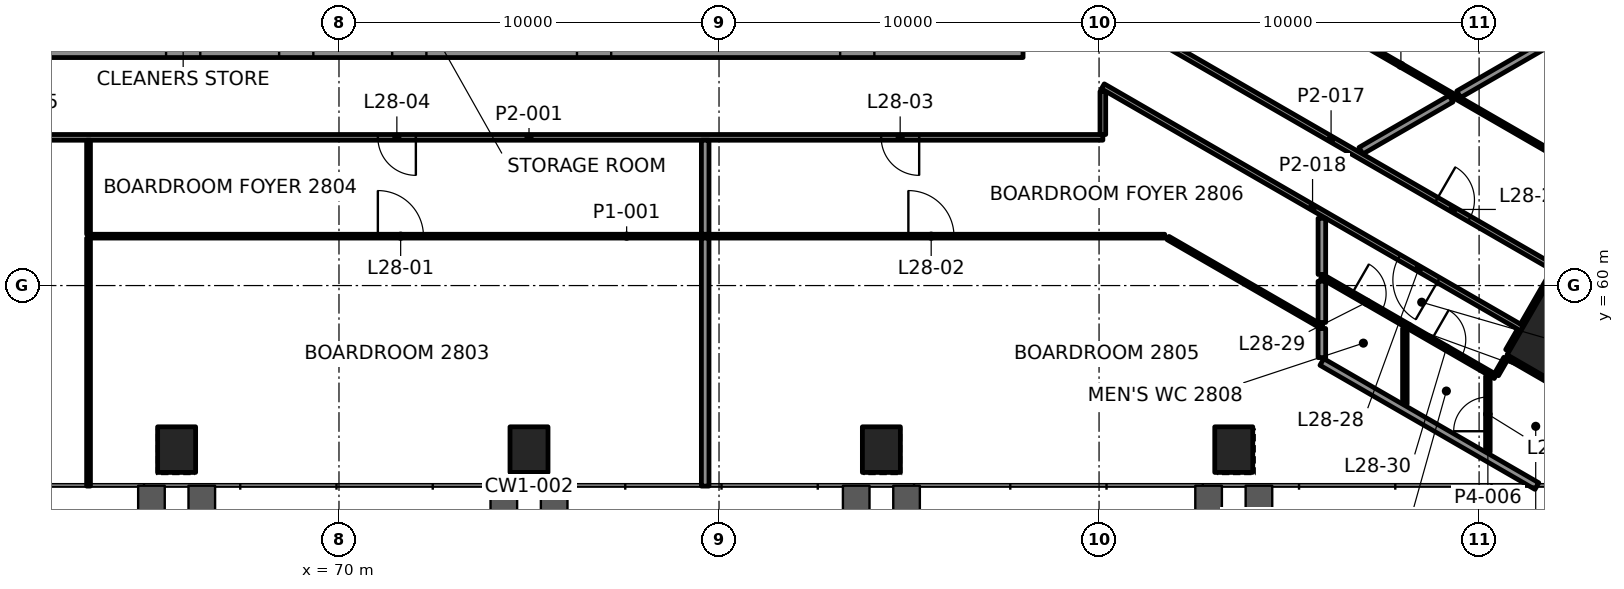
"""IFC4 building model, lengths in metres.
Left out: names, types, materials, properties, quantities, classifications, styles, units other than length and angle.
Written with IfcOpenShell. Run it as: python <this file> out.ifc"""

import sys

from ifc_helpers import new_model, si_unit, direction, frame, frame_2d, origin, origin_2d, place, context, subcontext, project, spatial, rectangle, extrude, element, fill, save


model = new_model("IFC4")
c1 = context("Model", 3, precision=1e-05, world=origin(), true_north=direction((0.0, 1.0)))
c2 = subcontext(c1, "Body", "Model", "MODEL_VIEW")
j1 = project(units=[si_unit("LENGTHUNIT", "METRE"), si_unit("PLANEANGLEUNIT", "RADIAN")], contexts=[c1])
p1 = place(None, origin())
s1 = spatial("IfcSite", under=j1, at=p1, CompositionType="ELEMENT")
p2 = place(p1, origin())
s2 = spatial("IfcBuilding", under=s1, at=p2, CompositionType="ELEMENT")
p3 = place(p2, frame((0.0, 0.0, 124.0)))
s3 = spatial("IfcBuildingStorey", under=s2, at=p3, CompositionType="ELEMENT", Elevation=124.0)
p4 = place(p3, frame((103.058, 58.801, 0.0), z_axis=(0.0, 0.0, 1.0), x_axis=(0.5, 0.866025403784, 0.0)))
e1 = element("IfcColumn", 1, at=p4, inside=s3, PredefinedType="COLUMN", context=c2, shape_type="SweptSolid", body=[
    extrude(rectangle(XDim=3.4, YDim=3.4, at=origin_2d()), origin(), (0.0, 0.0, 1.0), 4.2),
])
for number, where, z_axis, x_axis in (
    (2, (65.728, 55.683, -0.0), (0.0, 0.0, 1.0), (1.0, 0.0, 0.0)),
    (3, (75.0, 55.683, -0.0), (0.0, 0.0, 1.0), (1.0, 0.0, 0.0)),
    (4, (84.272, 55.683, -0.0), (0.0, 0.0, 1.0), (1.0, 0.0, 0.0)),
    (5, (93.545, 55.683, -0.0), (0.0, 0.0, 1.0), (1.0, 0.0, 0.0)),
):
    element("IfcColumn", number, at=place(p3, frame(where, z_axis=z_axis, x_axis=x_axis)), inside=s3, PredefinedType="COLUMN", context=c2, shape_type="SweptSolid", body=[
        extrude(rectangle(XDim=1.0, YDim=1.2, at=origin_2d()), origin(), (0.0, 0.0, 1.0), 4.2),
    ])
p5 = place(p3, frame((62.0, 66.45, 0.0), z_axis=(0.0, 0.0, 1.0), x_axis=(1.0, 0.0, 0.0)))
e6 = element("IfcWall", 6, at=p5, inside=s3, PredefinedType="SHEAR", context=c2, shape_type="SweptSolid", body=[
    extrude(rectangle(XDim=26.0, YDim=0.9, at=frame_2d((13.0, 0.0))), origin(), (0.0, 0.0, 1.0), 4.0),
])
p6 = place(p5, frame((3.45, 0.0, 0.0)))
e7 = element("IfcOpeningElement", 7, at=p6, cuts=e6, PredefinedType="OPENING", context=c2, shape_type="SweptSolid", body=[
    extrude(rectangle(XDim=0.9, YDim=2.1, at=frame_2d((0.45, 1.05))), frame((0.0, 0.46, 0.0), z_axis=(0.0, -1.0, 0.0), x_axis=(1.0, 0.0, 0.0)), (0.0, 0.0, 1.0), 0.92),
])
p7 = place(p5, frame((6.425, 0.0, 0.0)))
e8 = element("IfcOpeningElement", 8, at=p7, cuts=e6, PredefinedType="OPENING", context=c2, shape_type="SweptSolid", body=[
    extrude(rectangle(XDim=0.9, YDim=2.1, at=frame_2d((0.45, 1.05))), frame((0.0, 0.46, 0.0), z_axis=(0.0, -1.0, 0.0), x_axis=(1.0, 0.0, 0.0)), (0.0, 0.0, 1.0), 0.92),
])
p8 = place(p5, frame((9.4, 0.0, 0.0)))
e9 = element("IfcOpeningElement", 9, at=p8, cuts=e6, PredefinedType="OPENING", context=c2, shape_type="SweptSolid", body=[
    extrude(rectangle(XDim=0.9, YDim=2.1, at=frame_2d((0.45, 1.05))), frame((0.0, 0.46, 0.0), z_axis=(0.0, -1.0, 0.0), x_axis=(1.0, 0.0, 0.0)), (0.0, 0.0, 1.0), 0.92),
])
p9 = place(p5, frame((14.262, 0.0, 0.0)))
e10 = element("IfcOpeningElement", 10, at=p9, cuts=e6, PredefinedType="OPENING", context=c2, shape_type="SweptSolid", body=[
    extrude(rectangle(XDim=0.9, YDim=2.1, at=frame_2d((0.45, 1.05))), frame((0.0, 0.46, 0.0), z_axis=(0.0, -1.0, 0.0), x_axis=(1.0, 0.0, 0.0)), (0.0, 0.0, 1.0), 0.92),
])
p10 = place(p5, frame((21.188, 0.0, 0.0)))
e11 = element("IfcOpeningElement", 11, at=p10, cuts=e6, PredefinedType="OPENING", context=c2, shape_type="SweptSolid", body=[
    extrude(rectangle(XDim=0.9, YDim=2.1, at=frame_2d((0.45, 1.05))), frame((0.0, 0.46, 0.0), z_axis=(0.0, -1.0, 0.0), x_axis=(1.0, 0.0, 0.0)), (0.0, 0.0, 1.0), 0.92),
])
p11 = place(p3, frame((63.41, 61.3, 0.0), z_axis=(0.0, 0.0, 1.0), x_axis=(1.0, 0.0, 0.0)))
e12 = element("IfcWall", 12, at=p11, inside=s3, PredefinedType="PARTITIONING", context=c2, shape_type="SweptSolid", body=[
    extrude(rectangle(XDim=28.319, YDim=0.1, at=frame_2d((14.16, 0.0))), origin(), (0.0, 0.0, 1.0), 3.4),
])
p12 = place(p11, frame((7.613, 0.0, 0.0)))
e13 = element("IfcOpeningElement", 13, at=p12, cuts=e12, PredefinedType="OPENING", context=c2, shape_type="SweptSolid", body=[
    extrude(rectangle(XDim=1.2, YDim=2.1, at=frame_2d((0.6, 1.05))), frame((0.0, 0.06, 0.0), z_axis=(0.0, -1.0, 0.0), x_axis=(1.0, 0.0, 0.0)), (0.0, 0.0, 1.0), 0.12),
])
p13 = place(p11, frame((21.573, 0.0, 0.0)))
e14 = element("IfcOpeningElement", 14, at=p13, cuts=e12, PredefinedType="OPENING", context=c2, shape_type="SweptSolid", body=[
    extrude(rectangle(XDim=1.2, YDim=2.1, at=frame_2d((0.6, 1.05))), frame((0.0, 0.06, 0.0), z_axis=(0.0, -1.0, 0.0), x_axis=(1.0, 0.0, 0.0)), (0.0, 0.0, 1.0), 0.12),
])
p14 = place(p3, frame((90.1, 63.9, 0.0), z_axis=(0.0, 0.0, 1.0), x_axis=(-1.0, 0.0, 0.0)))
e15 = element("IfcWall", 15, at=p14, inside=s3, PredefinedType="PARTITIONING", context=c2, shape_type="SweptSolid", body=[
    extrude(rectangle(XDim=30.2, YDim=0.15, at=frame_2d((15.1, 0.0))), origin(), (0.0, 0.0, 1.0), 3.4),
])
p15 = place(p14, frame((4.833, 0.0, 0.0)))
e16 = element("IfcOpeningElement", 16, at=p15, cuts=e15, PredefinedType="OPENING", context=c2, shape_type="SweptSolid", body=[
    extrude(rectangle(XDim=1.0, YDim=2.1, at=frame_2d((0.5, 1.05))), frame((0.0, 0.085, 0.0), z_axis=(0.0, -1.0, 0.0), x_axis=(1.0, 0.0, 0.0)), (0.0, 0.0, 1.0), 0.17),
])
p16 = place(p14, frame((18.077, 0.0, 0.0)))
e17 = element("IfcOpeningElement", 17, at=p16, cuts=e15, PredefinedType="OPENING", context=c2, shape_type="SweptSolid", body=[
    extrude(rectangle(XDim=1.0, YDim=2.1, at=frame_2d((0.5, 1.05))), frame((0.0, 0.085, 0.0), z_axis=(0.0, -1.0, 0.0), x_axis=(1.0, 0.0, 0.0)), (0.0, 0.0, 1.0), 0.17),
])
p17 = place(p14, frame((27.893, 0.0, 0.0)))
e18 = element("IfcOpeningElement", 18, at=p17, cuts=e15, PredefinedType="OPENING", context=c2, shape_type="SweptSolid", body=[
    extrude(rectangle(XDim=0.9, YDim=2.1, at=frame_2d((0.45, 1.05))), frame((0.0, 0.085, 0.0), z_axis=(0.0, -1.0, 0.0), x_axis=(1.0, 0.0, 0.0)), (0.0, 0.0, 1.0), 0.17),
])
p18 = place(p3, frame((96.89, 63.548, 0.0), z_axis=(0.0, 0.0, 1.0), x_axis=(0.86604168154, 0.499971805041, 0.0)))
e19 = element("IfcWall", 19, at=p18, inside=s3, PredefinedType="PARTITIONING", context=c2, shape_type="SweptSolid", body=[
    extrude(rectangle(XDim=2.74, YDim=0.2, at=frame_2d((1.37, 0.0))), origin(), (0.0, 0.0, 1.0), 3.4),
])
p19 = place(p3, frame((100.458, 57.658, 0.0), z_axis=(0.0, 0.0, 1.0), x_axis=(0.499895202697, 0.866085900082, 0.0)))
e20 = element("IfcWall", 20, at=p19, inside=s3, PredefinedType="PARTITIONING", context=c2, shape_type="SweptSolid", body=[
    extrude(rectangle(XDim=0.489, YDim=0.12, at=frame_2d((0.245, 0.0))), origin(), (0.0, 0.0, 1.0), 3.4),
])
p20 = place(p3, frame((100.786, 58.265, 0.0), z_axis=(0.0, 0.0, 1.0), x_axis=(0.499880341542, 0.866094477606, 0.0)))
e21 = element("IfcWall", 21, at=p20, inside=s3, PredefinedType="PARTITIONING", context=c2, shape_type="SweptSolid", body=[
    extrude(rectangle(XDim=0.625, YDim=0.2, at=frame_2d((0.312, 0.0))), origin(), (0.0, 0.0, 1.0), 3.4),
])
p21 = place(p3, frame((100.231, 55.623, 0.0), z_axis=(0.0, 0.0, 1.0), x_axis=(0.0, 1.0, 0.0)))
e22 = element("IfcWall", 22, at=p21, inside=s3, PredefinedType="PARTITIONING", context=c2, shape_type="SweptSolid", body=[
    extrude(rectangle(XDim=1.987, YDim=0.12, at=frame_2d((0.993, 0.0))), origin(), (0.0, 0.0, 1.0), 3.4),
])
p22 = place(p21, frame((0.543, 0.0, 0.0)))
e23 = element("IfcOpeningElement", 23, at=p22, cuts=e22, PredefinedType="OPENING", context=c2, shape_type="SweptSolid", body=[
    extrude(rectangle(XDim=0.9, YDim=2.1, at=frame_2d((0.45, 1.05))), frame((0.0, 0.07, 0.0), z_axis=(0.0, -1.0, 0.0), x_axis=(1.0, 0.0, 0.0)), (0.0, 0.0, 1.0), 0.14),
])
p23 = place(p3, frame((98.047, 56.884, 0.0), z_axis=(0.0, 0.0, 1.0), x_axis=(0.0, 1.0, 0.0)))
e24 = element("IfcWall", 24, at=p23, inside=s3, PredefinedType="PARTITIONING", context=c2, shape_type="SweptSolid", body=[
    extrude(rectangle(XDim=1.987, YDim=0.12, at=frame_2d((0.993, 0.0))), origin(), (0.0, 0.0, 1.0), 3.4),
])
p24 = place(p3, frame((95.863, 58.105, 0.0), z_axis=(0.0, 0.0, 1.0), x_axis=(0.0, 1.0, 0.0)))
e25 = element("IfcWall", 25, at=p24, inside=s3, PredefinedType="PARTITIONING", context=c2, shape_type="SweptSolid", body=[
    extrude(rectangle(XDim=0.765, YDim=0.2, at=frame_2d((0.383, 0.0))), origin(), (0.0, 0.0, 1.0), 3.4),
])
p25 = place(p3, frame((90.1, 63.975, 0.0), z_axis=(0.0, 0.0, 1.0), x_axis=(0.0, 1.0, 0.0)))
e26 = element("IfcWall", 26, at=p25, inside=s3, PredefinedType="PARTITIONING", context=c2, shape_type="SweptSolid", body=[
    extrude(rectangle(XDim=1.131, YDim=0.15, at=frame_2d((0.565, 0.0))), origin(), (0.0, 0.0, 1.0), 3.247),
])
p26 = place(p3, frame((79.636, 54.723, 0.0), z_axis=(0.0, 0.0, 1.0), x_axis=(0.0, 1.0, 0.0)))
e27 = element("IfcWall", 27, at=p26, inside=s3, PredefinedType="PARTITIONING", context=c2, shape_type="SweptSolid", body=[
    extrude(rectangle(XDim=6.527, YDim=0.2, at=frame_2d((3.264, 0.0))), origin(), (0.0, 0.0, 1.0), 3.165),
])
p27 = place(p3, frame((63.41, 54.723, 0.0), z_axis=(0.0, 0.0, 1.0), x_axis=(0.0, 1.0, 0.0)))
e28 = element("IfcWall", 28, at=p27, inside=s3, PredefinedType="PARTITIONING", context=c2, shape_type="SweptSolid", body=[
    extrude(rectangle(XDim=6.527, YDim=0.1, at=frame_2d((3.264, 0.0))), origin(), (0.0, 0.0, 1.0), 3.165),
])
p28 = place(p3, frame((103.185, 62.769, 0.0), z_axis=(0.0, 0.0, 1.0), x_axis=(-0.866024396652, 0.5000017444, 0.0)))
e29 = element("IfcWall", 29, at=p28, inside=s3, PredefinedType="PARTITIONING", context=c2, shape_type="SweptSolid", body=[
    extrude(rectangle(XDim=12.107, YDim=0.1, at=frame_2d((6.053, 0.0))), origin(), (0.0, 0.0, 1.0), 3.4),
])
p29 = place(p3, frame((90.175, 67.278, 0.0), z_axis=(0.0, 0.0, 1.0), x_axis=(0.866022903348, -0.500004330858, 0.0)))
e30 = element("IfcWall", 30, at=p29, inside=s3, PredefinedType="PARTITIONING", context=c2, shape_type="SweptSolid", body=[
    extrude(rectangle(XDim=13.695, YDim=0.15, at=frame_2d((6.848, 0.0))), origin(), (0.0, 0.0, 1.0), 3.4),
])
p30 = place(p29, frame((10.05, 0.0, 0.0)))
e31 = element("IfcOpeningElement", 31, at=p30, cuts=e30, PredefinedType="OPENING", context=c2, shape_type="SweptSolid", body=[
    extrude(rectangle(XDim=1.0, YDim=2.1, at=frame_2d((0.5, 1.05))), frame((0.0, 0.085, 0.0), z_axis=(0.0, -1.0, 0.0), x_axis=(1.0, 0.0, 0.0)), (0.0, 0.0, 1.0), 0.17),
])
p31 = place(p3, frame((101.136, 58.871, 0.0), z_axis=(0.0, 0.0, 1.0), x_axis=(-0.866020317169, 0.500008810174, 0.0)))
e32 = element("IfcWall", 32, at=p31, inside=s3, PredefinedType="PARTITIONING", context=c2, shape_type="SweptSolid", body=[
    extrude(rectangle(XDim=12.743, YDim=0.15, at=frame_2d((6.372, 0.0))), origin(), (0.0, 0.0, 1.0), 3.247),
])
p32 = place(p31, frame((2.546, 0.0, 0.0)))
e33 = element("IfcOpeningElement", 33, at=p32, cuts=e32, PredefinedType="OPENING", context=c2, shape_type="SweptSolid", body=[
    extrude(rectangle(XDim=1.2, YDim=2.1, at=frame_2d((0.6, 1.05))), frame((0.0, 0.085, 0.0), z_axis=(0.0, -1.0, 0.0), x_axis=(1.0, 0.0, 0.0)), (0.0, 0.0, 1.0), 0.17),
])
p33 = place(p3, frame((103.819, 56.398, 0.0), z_axis=(0.0, 0.0, 1.0), x_axis=(-0.866004308173, 0.500036536891, 0.0)))
e34 = element("IfcWall", 34, at=p33, inside=s3, PredefinedType="PARTITIONING", context=c2, shape_type="SweptSolid", body=[
    extrude(rectangle(XDim=3.544, YDim=0.2, at=frame_2d((1.772, 0.0))), origin(), (0.0, 0.0, 1.0), 3.4),
])
p34 = place(p3, frame((95.863, 60.241, 0.0), z_axis=(0.0, 0.0, 1.0), x_axis=(0.866028224559, -0.499995114243, 0.0)))
e35 = element("IfcWall", 35, at=p34, inside=s3, PredefinedType="PARTITIONING", context=c2, shape_type="SweptSolid", body=[
    extrude(rectangle(XDim=5.271, YDim=0.12, at=frame_2d((2.635, 0.0))), origin(), (0.0, 0.0, 1.0), 3.4),
])
p35 = place(p34, frame((0.913, 0.0, 0.0)))
e36 = element("IfcOpeningElement", 36, at=p35, cuts=e35, PredefinedType="OPENING", context=c2, shape_type="SweptSolid", body=[
    extrude(rectangle(XDim=0.9, YDim=2.1, at=frame_2d((0.45, 1.05))), frame((0.0, 0.07, 0.0), z_axis=(0.0, -1.0, 0.0), x_axis=(1.0, 0.0, 0.0)), (0.0, 0.0, 1.0), 0.14),
])
p36 = place(p34, frame((3.333, 0.0, 0.0)))
e37 = element("IfcOpeningElement", 37, at=p36, cuts=e35, PredefinedType="OPENING", context=c2, shape_type="SweptSolid", body=[
    extrude(rectangle(XDim=0.9, YDim=2.1, at=frame_2d((0.45, 1.05))), frame((0.0, 0.07, 0.0), z_axis=(0.0, -1.0, 0.0), x_axis=(1.0, 0.0, 0.0)), (0.0, 0.0, 1.0), 0.14),
])
p37 = place(p3, frame((95.863, 58.914, 0.0), z_axis=(0.0, 0.0, 1.0), x_axis=(-0.866042039906, 0.499971184285, 0.0)))
e38 = element("IfcWall", 38, at=p37, inside=s3, PredefinedType="PARTITIONING", context=c2, shape_type="SweptSolid", body=[
    extrude(rectangle(XDim=4.673, YDim=0.1, at=frame_2d((2.336, 0.0))), origin(), (0.0, 0.0, 1.0), 3.4),
])
p38 = place(p3, frame((101.521, 54.723, 0.0), z_axis=(0.0, 0.0, 1.0), x_axis=(-0.866020061583, 0.50000925285, 0.0)))
e39 = element("IfcWall", 39, at=p38, inside=s3, PredefinedType="PARTITIONING", context=c2, shape_type="SweptSolid", body=[
    extrude(rectangle(XDim=6.534, YDim=0.2, at=frame_2d((3.267, 0.0))), origin(), (0.0, 0.0, 1.0), 3.4),
])
p39 = place(p3, frame((79.636, 61.35, 0.0), z_axis=(0.0, 0.0, 1.0), x_axis=(0.0, 1.0, 0.0)))
e40 = element("IfcWall", 40, at=p39, inside=s3, PredefinedType="PARTITIONING", context=c2, shape_type="SweptSolid", body=[
    extrude(rectangle(XDim=2.475, YDim=0.2, at=frame_2d((1.237, 0.0))), origin(), (0.0, 0.0, 1.0), 3.4),
])
p40 = place(p3, frame((99.463, 65.033, 0.0), z_axis=(0.0, 0.0, 1.0), x_axis=(0.866014978466, 0.500018056747, 0.0)))
e41 = element("IfcWall", 41, at=p40, inside=s3, PredefinedType="PARTITIONING", context=c2, shape_type="SweptSolid", body=[
    extrude(rectangle(XDim=4.075, YDim=0.2, at=frame_2d((2.038, 0.0))), origin(), (0.0, 0.0, 1.0), 3.4),
])
p41 = place(p3, frame((101.174, 58.936, 0.0), z_axis=(0.0, 0.0, 1.0), x_axis=(0.499991515992, 0.866030301974, 0.0)))
e42 = element("IfcWall", 42, at=p41, inside=s3, PredefinedType="PARTITIONING", context=c2, shape_type="SweptSolid", body=[
    extrude(rectangle(XDim=1.649, YDim=0.2, at=frame_2d((0.825, 0.0))), origin(), (0.0, 0.0, 1.0), 3.247),
])
p42 = place(p3, frame((95.863, 60.293, 0.0), z_axis=(0.0, 0.0, 1.0), x_axis=(0.0, 1.0, 0.0)))
e43 = element("IfcWall", 43, at=p42, inside=s3, PredefinedType="PARTITIONING", context=c2, shape_type="SweptSolid", body=[
    extrude(rectangle(XDim=1.476, YDim=0.2, at=frame_2d((0.738, 0.0))), origin(), (0.0, 0.0, 1.0), 3.4),
])
p43 = place(p3, frame((63.41, 61.35, 0.0), z_axis=(0.0, 0.0, 1.0), x_axis=(0.0, 1.0, 0.0)))
e44 = element("IfcWall", 44, at=p43, inside=s3, PredefinedType="PARTITIONING", context=c2, shape_type="SweptSolid", body=[
    extrude(rectangle(XDim=2.475, YDim=0.1, at=frame_2d((1.237, 0.0))), origin(), (0.0, 0.0, 1.0), 3.4),
])
p44 = place(p3, frame((95.863, 59.029, 0.0), z_axis=(0.0, 0.0, 1.0), x_axis=(0.0, 1.0, 0.0)))
e45 = element("IfcWall", 45, at=p44, inside=s3, PredefinedType="PARTITIONING", context=c2, shape_type="SweptSolid", body=[
    extrude(rectangle(XDim=1.085, YDim=0.2, at=frame_2d((0.543, 0.0))), origin(), (0.0, 0.0, 1.0), 3.4),
])
p45 = place(p12, origin())
e46 = element("IfcDoor", 46, at=p45, inside=s3, OperationType="DOUBLE_DOOR_SINGLE_SWING", PredefinedType="DOOR", context=c2, shape_type="SweptSolid", body=[
    extrude(rectangle(XDim=1.2, YDim=2.1, at=frame_2d((0.6, 1.05))), frame((0.0, 0.025, 0.0), z_axis=(0.0, -1.0, 0.0), x_axis=(1.0, 0.0, 0.0)), (0.0, 0.0, 1.0), 0.05),
])
fill(e13, e46)
p46 = place(p13, origin())
e47 = element("IfcDoor", 47, at=p46, inside=s3, OperationType="DOUBLE_DOOR_SINGLE_SWING", PredefinedType="DOOR", context=c2, shape_type="SweptSolid", body=[
    extrude(rectangle(XDim=1.2, YDim=2.1, at=frame_2d((0.6, 1.05))), frame((0.0, 0.025, 0.0), z_axis=(0.0, -1.0, 0.0), x_axis=(1.0, 0.0, 0.0)), (0.0, 0.0, 1.0), 0.05),
])
fill(e14, e47)
p47 = place(p15, origin())
e48 = element("IfcDoor", 48, at=p47, inside=s3, OperationType="SINGLE_SWING_RIGHT", PredefinedType="DOOR", context=c2, shape_type="SweptSolid", body=[
    extrude(rectangle(XDim=1.0, YDim=2.1, at=frame_2d((0.5, 1.05))), frame((0.0, 0.025, 0.0), z_axis=(0.0, -1.0, 0.0), x_axis=(1.0, 0.0, 0.0)), (0.0, 0.0, 1.0), 0.05),
])
fill(e16, e48)
p48 = place(p16, origin())
e49 = element("IfcDoor", 49, at=p48, inside=s3, OperationType="SINGLE_SWING_RIGHT", PredefinedType="DOOR", context=c2, shape_type="SweptSolid", body=[
    extrude(rectangle(XDim=1.0, YDim=2.1, at=frame_2d((0.5, 1.05))), frame((0.0, 0.025, 0.0), z_axis=(0.0, -1.0, 0.0), x_axis=(1.0, 0.0, 0.0)), (0.0, 0.0, 1.0), 0.05),
])
fill(e17, e49)
p49 = place(p22, origin())
e50 = element("IfcDoor", 50, at=p49, inside=s3, OperationType="SINGLE_SWING_LEFT", PredefinedType="DOOR", context=c2, shape_type="SweptSolid", body=[
    extrude(rectangle(XDim=0.9, YDim=2.1, at=frame_2d((0.45, 1.05))), frame((0.0, 0.025, 0.0), z_axis=(0.0, -1.0, 0.0), x_axis=(1.0, 0.0, 0.0)), (0.0, 0.0, 1.0), 0.05),
])
fill(e23, e50)
p50 = place(p30, origin())
e51 = element("IfcDoor", 51, at=p50, inside=s3, OperationType="SINGLE_SWING_LEFT", PredefinedType="DOOR", context=c2, shape_type="SweptSolid", body=[
    extrude(rectangle(XDim=1.0, YDim=2.1, at=frame_2d((0.5, 1.05))), frame((0.0, 0.025, 0.0), z_axis=(0.0, -1.0, 0.0), x_axis=(1.0, 0.0, 0.0)), (0.0, 0.0, 1.0), 0.05),
])
fill(e31, e51)
p51 = place(p32, origin())
e52 = element("IfcDoor", 52, at=p51, inside=s3, OperationType="DOUBLE_DOOR_SINGLE_SWING", PredefinedType="DOOR", context=c2, shape_type="SweptSolid", body=[
    extrude(rectangle(XDim=1.2, YDim=2.1, at=frame_2d((0.6, 1.05))), frame((0.0, 0.025, 0.0), z_axis=(0.0, -1.0, 0.0), x_axis=(1.0, 0.0, 0.0)), (0.0, 0.0, 1.0), 0.05),
])
fill(e33, e52)
p52 = place(p35, origin())
e53 = element("IfcDoor", 53, at=p52, inside=s3, OperationType="SINGLE_SWING_RIGHT", PredefinedType="DOOR", context=c2, shape_type="SweptSolid", body=[
    extrude(rectangle(XDim=0.9, YDim=2.1, at=frame_2d((0.45, 1.05))), frame((0.0, 0.025, 0.0), z_axis=(0.0, -1.0, 0.0), x_axis=(1.0, 0.0, 0.0)), (0.0, 0.0, 1.0), 0.05),
])
fill(e36, e53)
p53 = place(p36, origin())
e54 = element("IfcDoor", 54, at=p53, inside=s3, OperationType="SINGLE_SWING_LEFT", PredefinedType="DOOR", context=c2, shape_type="SweptSolid", body=[
    extrude(rectangle(XDim=0.9, YDim=2.1, at=frame_2d((0.45, 1.05))), frame((0.0, 0.025, 0.0), z_axis=(0.0, -1.0, 0.0), x_axis=(1.0, 0.0, 0.0)), (0.0, 0.0, 1.0), 0.05),
])
fill(e37, e54)
save(model, sys.argv[1])
